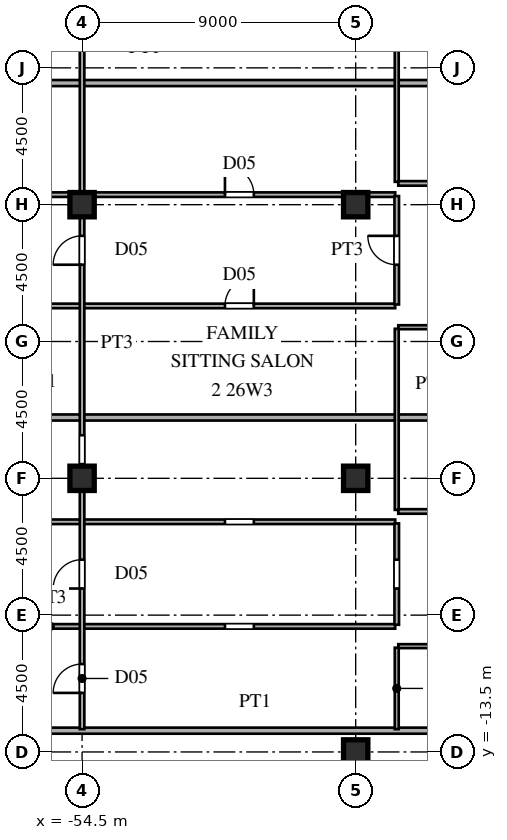
"""IFC4 building model, lengths in metres.
Left out: names, types, materials, properties, quantities, classifications, styles, units other than length and angle.
Written with IfcOpenShell. Run it as: python <this file> out.ifc"""

import sys

from ifc_helpers import new_model, si_unit, direction, frame, frame_2d, origin, origin_2d, place, context, subcontext, project, spatial, rectangle, i_section, extrude, source, transform, mapped, element, fill, save


model = new_model("IFC4")
c1 = context("Model", 3, precision=1e-05, world=origin(), true_north=direction((0.0, 1.0)))
c2 = subcontext(c1, "Body", "Model", "MODEL_VIEW")
j1 = project(units=[si_unit("LENGTHUNIT", "METRE"), si_unit("PLANEANGLEUNIT", "RADIAN")], contexts=[c1])
p1 = place(None, origin())
s1 = spatial("IfcSite", under=j1, at=p1, CompositionType="ELEMENT")
p2 = place(p1, origin())
s2 = spatial("IfcBuilding", under=s1, at=p2, CompositionType="ELEMENT")
p3 = place(p2, frame((0.0, 0.0, 99.6)))
s3 = spatial("IfcBuildingStorey", under=s2, at=p3, CompositionType="ELEMENT", Elevation=99.6)
m1 = source(origin(), c2, "Body", "SweptSolid", [
    extrude(i_section(OverallWidth=0.8, OverallDepth=0.8, WebThickness=0.032, FlangeThickness=0.05, at=origin_2d()), origin(), (0.0, 0.0, 1.0), 3.6),
])
for number, where, z_axis, x_axis in (
    (1, (-45.5, -13.5, 0.0), (0.0, 0.0, 1.0), (1.0, 0.0, 0.0)),
    (2, (-45.5, -4.5, 0.0), (0.0, 0.0, 1.0), (1.0, 0.0, 0.0)),
    (3, (-45.5, 4.5, 0.0), (0.0, 0.0, 1.0), (1.0, 0.0, 0.0)),
    (4, (-54.5, -4.5, 0.0), (0.0, 0.0, 1.0), (1.0, 0.0, 0.0)),
    (5, (-54.5, 4.5, 0.0), (0.0, 0.0, 1.0), (1.0, 0.0, 0.0)),
):
    element("IfcColumn", number, at=place(p3, frame(where, z_axis=z_axis, x_axis=x_axis)), inside=s3, PredefinedType="COLUMN", context=c2, shape_type="MappedRepresentation", body=[
        mapped(m1, transform((0.0, 0.0, 0.0), scale=1.0)),
    ])
p4 = place(p3, frame((-59.234, -12.8, 0.0), z_axis=(0.0, 0.0, 1.0), x_axis=(1.0, 0.0, 0.0)))
e6 = element("IfcWall", 6, at=p4, inside=s3, PredefinedType="PARTITIONING", context=c2, shape_type="SweptSolid", body=[
    extrude(rectangle(XDim=20.854, YDim=0.2, at=frame_2d((10.427, 0.0))), origin(), (0.0, 0.0, 1.0), 3.38),
])
p5 = place(p3, frame((-44.1, -10.02, 0.0), z_axis=(0.0, 0.0, 1.0), x_axis=(1.0, 0.0, 0.0)))
e7 = element("IfcWall", 7, at=p5, inside=s3, PredefinedType="PARTITIONING", context=c2, shape_type="SweptSolid", body=[
    extrude(rectangle(XDim=5.75, YDim=0.13, at=frame_2d((2.875, 0.0))), origin(), (0.0, 0.0, 1.0), 3.38),
])
p6 = place(p5, frame((2.435, 0.0, 0.0)))
e8 = element("IfcOpeningElement", 8, at=p6, cuts=e7, PredefinedType="OPENING", context=c2, shape_type="SweptSolid", body=[
    extrude(rectangle(XDim=0.88, YDim=2.1, at=frame_2d((0.44, 1.05))), frame((0.0, 0.075, 0.0), z_axis=(0.0, -1.0, 0.0), x_axis=(1.0, 0.0, 0.0)), (0.0, 0.0, 1.0), 0.15),
])
p7 = place(p3, frame((-66.887, -9.37, 0.0), z_axis=(0.0, 0.0, 1.0), x_axis=(1.0, 0.0, 0.0)))
e9 = element("IfcWall", 9, at=p7, inside=s3, PredefinedType="PARTITIONING", context=c2, shape_type="SweptSolid", body=[
    extrude(rectangle(XDim=22.687, YDim=0.15, at=frame_2d((11.344, 0.0))), origin(), (0.0, 0.0, 1.0), 3.38),
])
p8 = place(p7, frame((17.087, 0.0, 0.0)))
e10 = element("IfcOpeningElement", 10, at=p8, cuts=e9, PredefinedType="OPENING", context=c2, shape_type="SweptSolid", body=[
    extrude(rectangle(XDim=0.95, YDim=2.15, at=frame_2d((0.475, 1.075))), frame((0.0, 0.085, 0.0), z_axis=(0.0, -1.0, 0.0), x_axis=(1.0, 0.0, 0.0)), (0.0, 0.0, 1.0), 0.17),
])
p9 = place(p3, frame((-71.035, -5.93, 0.0), z_axis=(0.0, 0.0, 1.0), x_axis=(1.0, 0.0, 0.0)))
e11 = element("IfcWall", 11, at=p9, inside=s3, PredefinedType="PARTITIONING", context=c2, shape_type="SweptSolid", body=[
    extrude(rectangle(XDim=26.835, YDim=0.15, at=frame_2d((13.417, 0.0))), origin(), (0.0, 0.0, 1.0), 3.38),
])
p10 = place(p9, frame((21.235, 0.0, 0.0)))
e12 = element("IfcOpeningElement", 12, at=p10, cuts=e11, PredefinedType="OPENING", context=c2, shape_type="SweptSolid", body=[
    extrude(rectangle(XDim=0.95, YDim=2.15, at=frame_2d((0.475, 1.075))), frame((0.0, 0.085, 0.0), z_axis=(0.0, -1.0, 0.0), x_axis=(1.0, 0.0, 0.0)), (0.0, 0.0, 1.0), 0.17),
])
p11 = place(p3, frame((-44.1, -5.59, 0.0), z_axis=(0.0, 0.0, 1.0), x_axis=(1.0, 0.0, 0.0)))
e13 = element("IfcWall", 13, at=p11, inside=s3, PredefinedType="PARTITIONING", context=c2, shape_type="SweptSolid", body=[
    extrude(rectangle(XDim=5.75, YDim=0.15, at=frame_2d((2.875, 0.0))), origin(), (0.0, 0.0, 1.0), 3.38),
])
p12 = place(p11, frame((2.4, 0.0, 0.0)))
e14 = element("IfcOpeningElement", 14, at=p12, cuts=e13, PredefinedType="OPENING", context=c2, shape_type="SweptSolid", body=[
    extrude(rectangle(XDim=0.95, YDim=2.15, at=frame_2d((0.475, 1.075))), frame((0.0, 0.085, 0.0), z_axis=(0.0, -1.0, 0.0), x_axis=(1.0, 0.0, 0.0)), (0.0, 0.0, 1.0), 0.17),
])
p13 = place(p3, frame((-71.005, -2.5, 0.0), z_axis=(0.0, 0.0, 1.0), x_axis=(1.0, 0.0, 0.0)))
e15 = element("IfcWall", 15, at=p13, inside=s3, PredefinedType="PARTITIONING", context=c2, shape_type="SweptSolid", body=[
    extrude(rectangle(XDim=32.625, YDim=0.2, at=frame_2d((16.312, 0.0))), origin(), (0.0, 0.0, 1.0), 3.38),
])
p14 = place(p3, frame((-44.1, 0.47, 0.0), z_axis=(0.0, 0.0, 1.0), x_axis=(1.0, 0.0, 0.0)))
e16 = element("IfcWall", 16, at=p14, inside=s3, PredefinedType="PARTITIONING", context=c2, shape_type="SweptSolid", body=[
    extrude(rectangle(XDim=5.75, YDim=0.13, at=frame_2d((2.875, 0.0))), origin(), (0.0, 0.0, 1.0), 3.38),
])
p15 = place(p14, frame((2.435, 0.0, 0.0)))
e17 = element("IfcOpeningElement", 17, at=p15, cuts=e16, PredefinedType="OPENING", context=c2, shape_type="SweptSolid", body=[
    extrude(rectangle(XDim=0.88, YDim=2.1, at=frame_2d((0.44, 1.05))), frame((0.0, 0.075, 0.0), z_axis=(0.0, -1.0, 0.0), x_axis=(1.0, 0.0, 0.0)), (0.0, 0.0, 1.0), 0.15),
])
p16 = place(p3, frame((-71.035, 1.17, 0.0), z_axis=(0.0, 0.0, 1.0), x_axis=(1.0, 0.0, 0.0)))
e18 = element("IfcWall", 18, at=p16, inside=s3, PredefinedType="PARTITIONING", context=c2, shape_type="SweptSolid", body=[
    extrude(rectangle(XDim=26.835, YDim=0.15, at=frame_2d((13.417, 0.0))), origin(), (0.0, 0.0, 1.0), 3.38),
])
p17 = place(p16, frame((21.235, 0.0, 0.0)))
e19 = element("IfcOpeningElement", 19, at=p17, cuts=e18, PredefinedType="OPENING", context=c2, shape_type="SweptSolid", body=[
    extrude(rectangle(XDim=0.95, YDim=2.15, at=frame_2d((0.475, 1.075))), frame((0.0, 0.085, 0.0), z_axis=(0.0, -1.0, 0.0), x_axis=(1.0, 0.0, 0.0)), (0.0, 0.0, 1.0), 0.17),
])
p18 = place(p16, frame((13.21, 0.0, 0.0)))
e20 = element("IfcOpeningElement", 20, at=p18, cuts=e18, PredefinedType="OPENING", context=c2, shape_type="SweptSolid", body=[
    extrude(rectangle(XDim=0.95, YDim=2.15, at=frame_2d((0.475, 1.075))), frame((0.0, 0.085, 0.0), z_axis=(0.0, -1.0, 0.0), x_axis=(1.0, 0.0, 0.0)), (0.0, 0.0, 1.0), 0.17),
])
p19 = place(p3, frame((-71.035, 4.83, 0.0), z_axis=(0.0, 0.0, 1.0), x_axis=(1.0, 0.0, 0.0)))
e21 = element("IfcWall", 21, at=p19, inside=s3, PredefinedType="PARTITIONING", context=c2, shape_type="SweptSolid", body=[
    extrude(rectangle(XDim=26.835, YDim=0.15, at=frame_2d((13.417, 0.0))), origin(), (0.0, 0.0, 1.0), 3.38),
])
p20 = place(p19, frame((21.235, 0.0, 0.0)))
e22 = element("IfcOpeningElement", 22, at=p20, cuts=e21, PredefinedType="OPENING", context=c2, shape_type="SweptSolid", body=[
    extrude(rectangle(XDim=0.95, YDim=2.15, at=frame_2d((0.475, 1.075))), frame((0.0, 0.085, 0.0), z_axis=(0.0, -1.0, 0.0), x_axis=(1.0, 0.0, 0.0)), (0.0, 0.0, 1.0), 0.17),
])
p21 = place(p19, frame((13.21, 0.0, 0.0)))
e23 = element("IfcOpeningElement", 23, at=p21, cuts=e21, PredefinedType="OPENING", context=c2, shape_type="SweptSolid", body=[
    extrude(rectangle(XDim=0.95, YDim=2.15, at=frame_2d((0.475, 1.075))), frame((0.0, 0.085, 0.0), z_axis=(0.0, -1.0, 0.0), x_axis=(1.0, 0.0, 0.0)), (0.0, 0.0, 1.0), 0.17),
])
p22 = place(p3, frame((-44.1, 5.2, 0.0), z_axis=(0.0, 0.0, 1.0), x_axis=(1.0, 0.0, 0.0)))
e24 = element("IfcWall", 24, at=p22, inside=s3, PredefinedType="PARTITIONING", context=c2, shape_type="SweptSolid", body=[
    extrude(rectangle(XDim=5.75, YDim=0.15, at=frame_2d((2.875, 0.0))), origin(), (0.0, 0.0, 1.0), 3.38),
])
p23 = place(p22, frame((2.4, 0.0, 0.0)))
e25 = element("IfcOpeningElement", 25, at=p23, cuts=e24, PredefinedType="OPENING", context=c2, shape_type="SweptSolid", body=[
    extrude(rectangle(XDim=0.95, YDim=2.15, at=frame_2d((0.475, 1.075))), frame((0.0, 0.085, 0.0), z_axis=(0.0, -1.0, 0.0), x_axis=(1.0, 0.0, 0.0)), (0.0, 0.0, 1.0), 0.17),
])
p24 = place(p3, frame((-68.79, 8.5, 0.0), z_axis=(0.0, 0.0, 1.0), x_axis=(1.0, 0.0, 0.0)))
e26 = element("IfcWall", 26, at=p24, inside=s3, PredefinedType="PARTITIONING", context=c2, shape_type="SweptSolid", body=[
    extrude(rectangle(XDim=30.41, YDim=0.2, at=frame_2d((15.205, 0.0))), origin(), (0.0, 0.0, 1.0), 3.38),
])
p25 = place(p3, frame((-54.5, -12.75, 0.0), z_axis=(0.0, 0.0, 1.0), x_axis=(0.0, 1.0, 0.0)))
e27 = element("IfcWall", 27, at=p25, inside=s3, PredefinedType="PARTITIONING", context=c2, shape_type="SweptSolid", body=[
    extrude(rectangle(XDim=27.71, YDim=0.15, at=frame_2d((13.855, 0.0))), origin(), (0.0, 0.0, 1.0), 2.68),
])
p26 = place(p25, frame((4.625, 0.0, 0.0)))
e28 = element("IfcOpeningElement", 28, at=p26, cuts=e27, PredefinedType="OPENING", context=c2, shape_type="SweptSolid", body=[
    extrude(rectangle(XDim=0.95, YDim=2.15, at=frame_2d((0.475, 1.075))), frame((0.0, 0.085, 0.0), z_axis=(0.0, -1.0, 0.0), x_axis=(1.0, 0.0, 0.0)), (0.0, 0.0, 1.0), 0.17),
])
p27 = place(p25, frame((1.192, 0.0, 0.0)))
e29 = element("IfcOpeningElement", 29, at=p27, cuts=e27, PredefinedType="OPENING", context=c2, shape_type="SweptSolid", body=[
    extrude(rectangle(XDim=0.95, YDim=2.15, at=frame_2d((0.475, 1.075))), frame((0.0, 0.085, 0.0), z_axis=(0.0, -1.0, 0.0), x_axis=(1.0, 0.0, 0.0)), (0.0, 0.0, 1.0), 0.17),
])
p28 = place(p25, frame((8.717, 0.0, 0.0)))
e30 = element("IfcOpeningElement", 30, at=p28, cuts=e27, PredefinedType="OPENING", context=c2, shape_type="SweptSolid", body=[
    extrude(rectangle(XDim=0.95, YDim=2.15, at=frame_2d((0.475, 1.075))), frame((0.0, 0.085, 0.0), z_axis=(0.0, -1.0, 0.0), x_axis=(1.0, 0.0, 0.0)), (0.0, 0.0, 1.0), 0.17),
])
p29 = place(p25, frame((15.275, 0.0, 0.0)))
e31 = element("IfcOpeningElement", 31, at=p29, cuts=e27, PredefinedType="OPENING", context=c2, shape_type="SweptSolid", body=[
    extrude(rectangle(XDim=0.95, YDim=2.15, at=frame_2d((0.475, 1.075))), frame((0.0, 0.085, 0.0), z_axis=(0.0, -1.0, 0.0), x_axis=(1.0, 0.0, 0.0)), (0.0, 0.0, 1.0), 0.17),
])
p30 = place(p25, frame((25.835, 0.0, 0.0)))
e32 = element("IfcOpeningElement", 32, at=p30, cuts=e27, PredefinedType="OPENING", context=c2, shape_type="SweptSolid", body=[
    extrude(rectangle(XDim=0.95, YDim=2.15, at=frame_2d((0.475, 1.075))), frame((0.0, 0.085, 0.0), z_axis=(0.0, -1.0, 0.0), x_axis=(1.0, 0.0, 0.0)), (0.0, 0.0, 1.0), 0.17),
])
p31 = place(p3, frame((-44.15, -12.75, 0.0), z_axis=(0.0, 0.0, 1.0), x_axis=(0.0, 1.0, 0.0)))
e33 = element("IfcWall", 33, at=p31, inside=s3, PredefinedType="PARTITIONING", context=c2, shape_type="SweptSolid", body=[
    extrude(rectangle(XDim=2.679, YDim=0.13, at=frame_2d((1.339, 0.0))), origin(), (0.0, 0.0, 1.0), 3.38),
])
p32 = place(p3, frame((-44.15, -9.317, 0.0), z_axis=(0.0, 0.0, 1.0), x_axis=(0.0, 1.0, 0.0)))
e34 = element("IfcWall", 34, at=p32, inside=s3, PredefinedType="PARTITIONING", context=c2, shape_type="SweptSolid", body=[
    extrude(rectangle(XDim=3.334, YDim=0.15, at=frame_2d((1.667, 0.0))), origin(), (0.0, 0.0, 1.0), 3.38),
])
p33 = place(p32, frame((1.192, 0.0, 0.0)))
e35 = element("IfcOpeningElement", 35, at=p33, cuts=e34, PredefinedType="OPENING", context=c2, shape_type="SweptSolid", body=[
    extrude(rectangle(XDim=0.95, YDim=2.15, at=frame_2d((0.475, 1.075))), frame((0.0, 0.085, 0.0), z_axis=(0.0, -1.0, 0.0), x_axis=(1.0, 0.0, 0.0)), (0.0, 0.0, 1.0), 0.17),
])
p34 = place(p3, frame((-44.15, -5.538, 0.0), z_axis=(0.0, 0.0, 1.0), x_axis=(0.0, 1.0, 0.0)))
e36 = element("IfcWall", 36, at=p34, inside=s3, PredefinedType="PARTITIONING", context=c2, shape_type="SweptSolid", body=[
    extrude(rectangle(XDim=5.956, YDim=0.13, at=frame_2d((2.978, 0.0))), origin(), (0.0, 0.0, 1.0), 3.38),
])
p35 = place(p3, frame((-44.15, 1.217, 0.0), z_axis=(0.0, 0.0, 1.0), x_axis=(0.0, 1.0, 0.0)))
e37 = element("IfcWall", 37, at=p35, inside=s3, PredefinedType="PARTITIONING", context=c2, shape_type="SweptSolid", body=[
    extrude(rectangle(XDim=3.566, YDim=0.15, at=frame_2d((1.783, 0.0))), origin(), (0.0, 0.0, 1.0), 3.38),
])
p36 = place(p35, frame((1.308, 0.0, 0.0)))
e38 = element("IfcOpeningElement", 38, at=p36, cuts=e37, PredefinedType="OPENING", context=c2, shape_type="SweptSolid", body=[
    extrude(rectangle(XDim=0.95, YDim=2.15, at=frame_2d((0.475, 1.075))), frame((0.0, 0.085, 0.0), z_axis=(0.0, -1.0, 0.0), x_axis=(1.0, 0.0, 0.0)), (0.0, 0.0, 1.0), 0.17),
])
p37 = place(p3, frame((-44.15, 5.252, 0.0), z_axis=(0.0, 0.0, 1.0), x_axis=(0.0, 1.0, 0.0)))
e39 = element("IfcWall", 39, at=p37, inside=s3, PredefinedType="PARTITIONING", context=c2, shape_type="SweptSolid", body=[
    extrude(rectangle(XDim=14.365, YDim=0.13, at=frame_2d((7.183, 0.0))), origin(), (0.0, 0.0, 1.0), 3.38),
])
p38 = place(p37, frame((9.29, 0.0, 0.0)))
e40 = element("IfcOpeningElement", 40, at=p38, cuts=e39, PredefinedType="OPENING", context=c2, shape_type="SweptSolid", body=[
    extrude(rectangle(XDim=0.95, YDim=2.15, at=frame_2d((0.475, 1.075))), frame((0.0, 0.075, 0.0), z_axis=(0.0, -1.0, 0.0), x_axis=(1.0, 0.0, 0.0)), (0.0, 0.0, 1.0), 0.15),
])
m2 = source(origin(), c2, "Body", "SweptSolid", [
    extrude(rectangle(XDim=0.95, YDim=2.15, at=frame_2d((0.475, 1.075))), frame((0.0, 0.025, 0.0), z_axis=(0.0, -1.0, 0.0), x_axis=(1.0, 0.0, 0.0)), (0.0, 0.0, 1.0), 0.05),
])
p39 = place(p17, origin())
e41 = element("IfcDoor", 41, at=p39, inside=s3, OperationType="SINGLE_SWING_RIGHT", PredefinedType="DOOR", context=c2, shape_type="MappedRepresentation", body=[
    mapped(m2, transform((0.0, 0.0, 0.0), scale=1.0)),
])
fill(e19, e41)
p40 = place(p20, origin())
e42 = element("IfcDoor", 42, at=p40, inside=s3, OperationType="SINGLE_SWING_LEFT", PredefinedType="DOOR", context=c2, shape_type="MappedRepresentation", body=[
    mapped(m2, transform((0.0, 0.0, 0.0), scale=1.0)),
])
fill(e22, e42)
p41 = place(p26, origin())
e43 = element("IfcDoor", 43, at=p41, inside=s3, OperationType="SINGLE_SWING_LEFT", PredefinedType="DOOR", context=c2, shape_type="MappedRepresentation", body=[
    mapped(m2, transform((0.0, 0.0, 0.0), scale=1.0)),
])
fill(e28, e43)
p42 = place(p27, origin())
e44 = element("IfcDoor", 44, at=p42, inside=s3, OperationType="SINGLE_SWING_LEFT", PredefinedType="DOOR", context=c2, shape_type="MappedRepresentation", body=[
    mapped(m2, transform((0.0, 0.0, 0.0), scale=1.0)),
])
fill(e29, e44)
p43 = place(p29, origin())
e45 = element("IfcDoor", 45, at=p43, inside=s3, OperationType="SINGLE_SWING_LEFT", PredefinedType="DOOR", context=c2, shape_type="MappedRepresentation", body=[
    mapped(m2, transform((0.0, 0.0, 0.0), scale=1.0)),
])
fill(e31, e45)
p44 = place(p36, origin())
e46 = element("IfcDoor", 46, at=p44, inside=s3, OperationType="SINGLE_SWING_RIGHT", PredefinedType="DOOR", context=c2, shape_type="MappedRepresentation", body=[
    mapped(m2, transform((0.0, 0.0, 0.0), scale=1.0)),
])
fill(e38, e46)
save(model, sys.argv[1])
